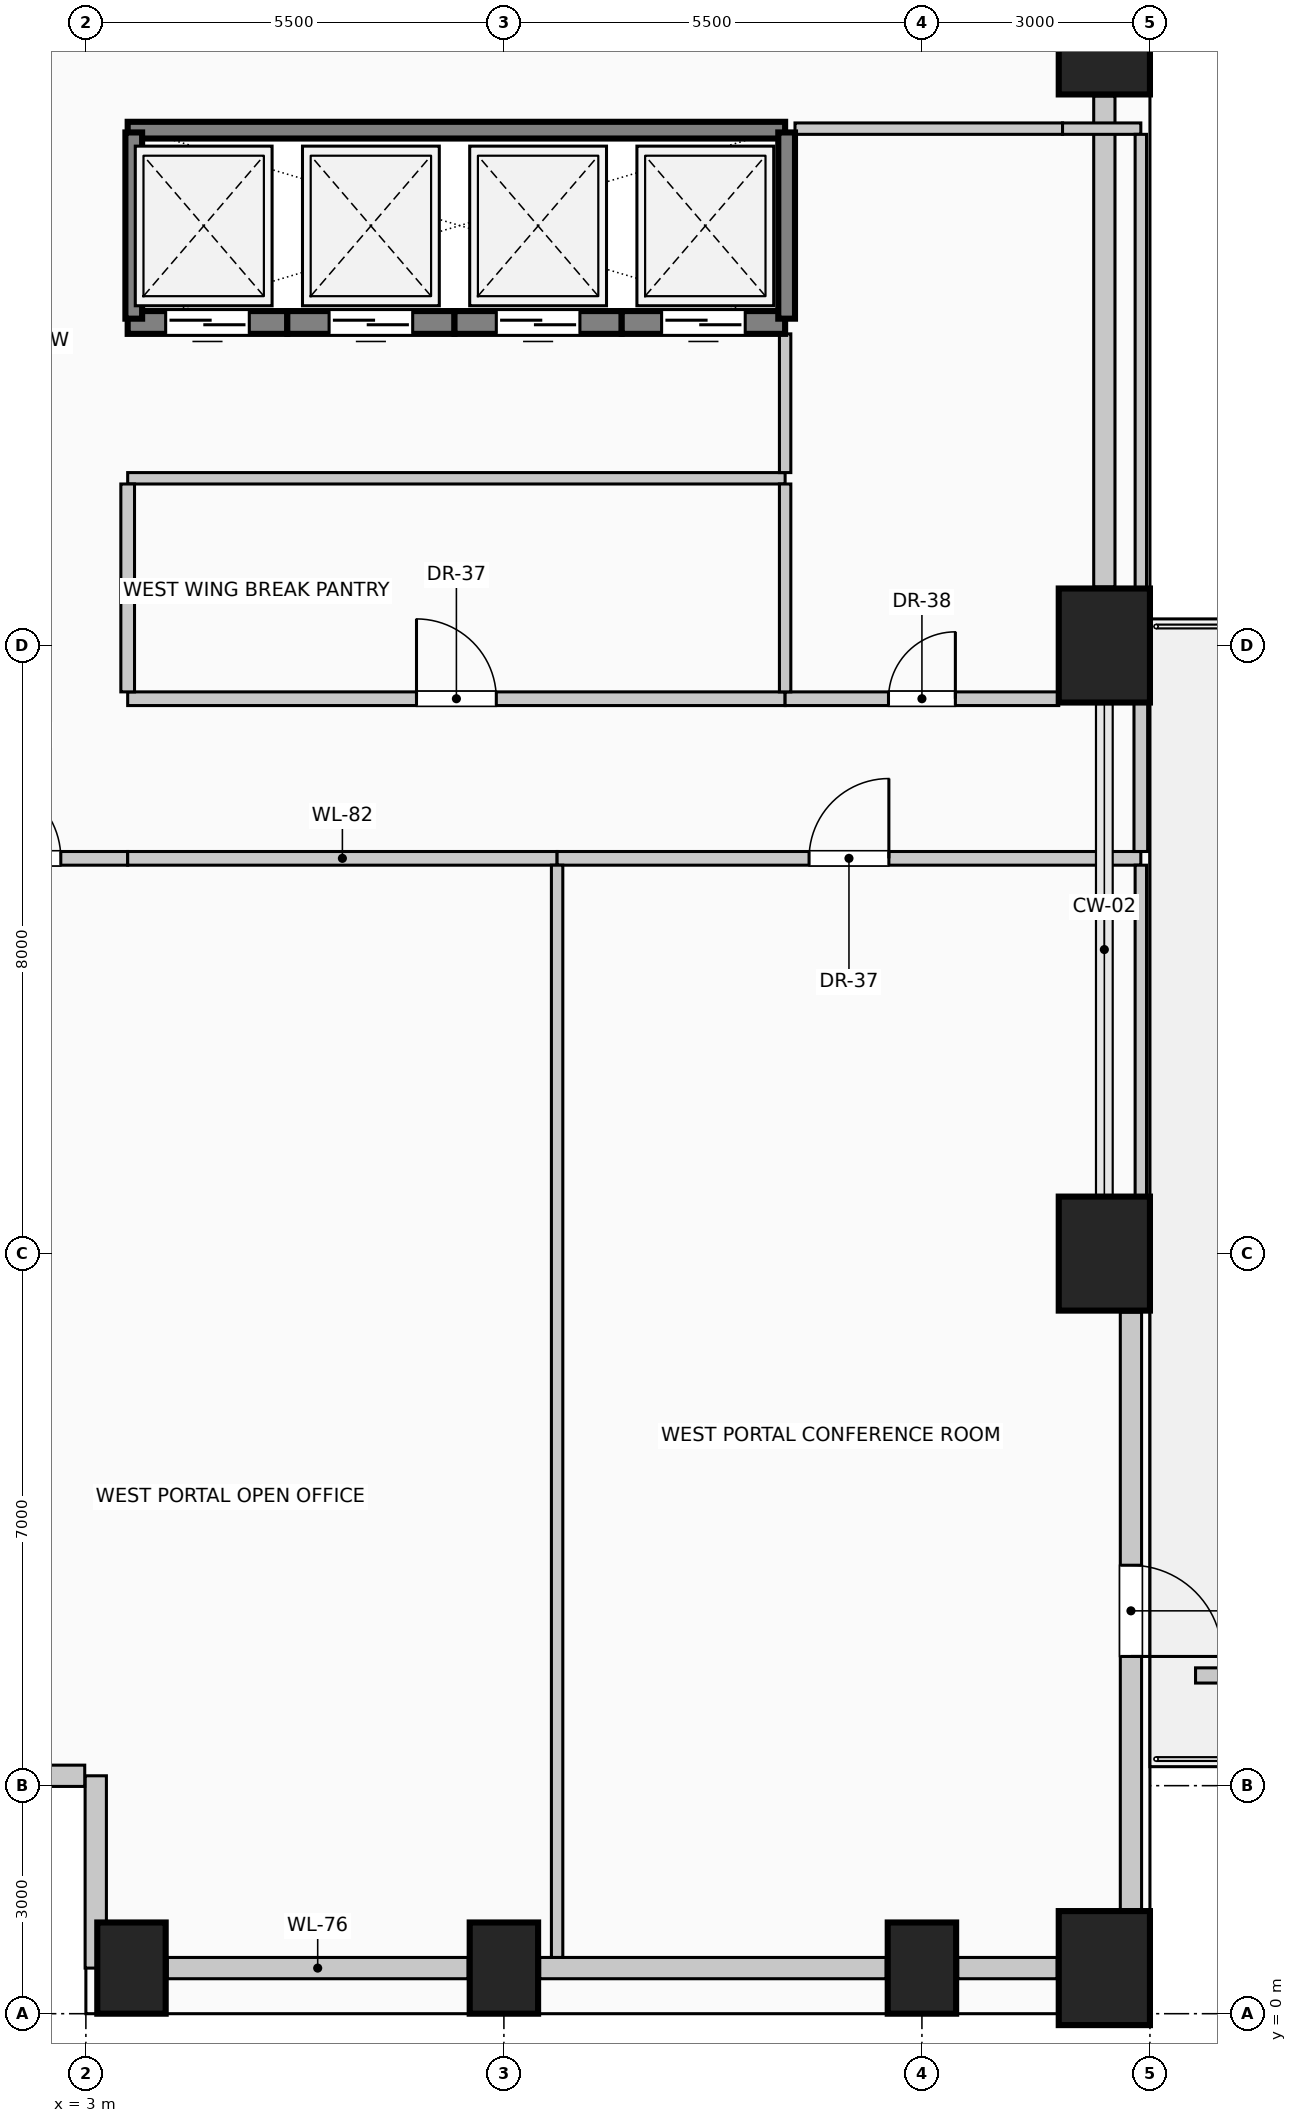
"""IFC4 building model, lengths in metres.
Left out: names, types, materials, properties, quantities, classifications, styles, units other than length and angle.
Written with IfcOpenShell. Run it as: python <this file> out.ifc"""

import sys

from ifc_helpers import new_model, si_unit, direction, frame, frame_2d, origin, origin_2d, place, context, subcontext, project, spatial, rectangle, extrude, element, fill, save


model = new_model("IFC4")
c1 = context("Model", 3, precision=1e-05, world=origin(), true_north=direction((0.0, 1.0)))
c2 = subcontext(c1, "Body", "Model", "MODEL_VIEW")
j1 = project(units=[si_unit("LENGTHUNIT", "METRE"), si_unit("PLANEANGLEUNIT", "RADIAN")], contexts=[c1])
p1 = place(None, origin())
s1 = spatial("IfcSite", under=j1, at=p1, CompositionType="ELEMENT")
p2 = place(p1, origin())
s2 = spatial("IfcBuilding", under=s1, at=p2, CompositionType="ELEMENT")
p3 = place(p2, frame((0.0, 0.0, 22.6)))
s3 = spatial("IfcBuildingStorey", under=s2, at=p3, CompositionType="ELEMENT", Elevation=22.6)
for number, where, z_axis, x_axis in (
    (1, (3.6, 0.6, 0.0), (0.0, 0.0, 1.0), (1.0, 0.0, 0.0)),
    (2, (8.5, 0.6, 0.0), (0.0, 0.0, 1.0), (1.0, 0.0, 0.0)),
    (3, (14.0, 0.6, 0.0), (0.0, 0.0, 1.0), (1.0, 0.0, 0.0)),
):
    element("IfcColumn", number, at=place(p3, frame(where, z_axis=z_axis, x_axis=x_axis)), inside=s3, PredefinedType="COLUMN", context=c2, shape_type="SweptSolid", body=[
        extrude(rectangle(XDim=0.9, YDim=1.2, at=origin_2d()), origin(), (0.0, 0.0, 1.0), 4.0),
    ])
for number, where, z_axis, x_axis in (
    (4, (16.4, 0.6, 0.0), (0.0, 0.0, 1.0), (1.0, 0.0, 0.0)),
    (5, (16.4, 10.0, 0.0), (0.0, 0.0, 1.0), (1.0, 0.0, 0.0)),
    (6, (16.4, 18.0, 0.0), (0.0, 0.0, 1.0), (1.0, 0.0, 0.0)),
    (7, (16.4, 26.0, 0.0), (0.0, 0.0, 1.0), (1.0, 0.0, 0.0)),
):
    element("IfcColumn", number, at=place(p3, frame(where, z_axis=z_axis, x_axis=x_axis)), inside=s3, PredefinedType="COLUMN", context=c2, shape_type="SweptSolid", body=[
        extrude(rectangle(XDim=1.2, YDim=1.5, at=origin_2d()), origin(), (0.0, 0.0, 1.0), 4.0),
    ])
p4 = place(p3, frame((8.03, 0.6, 0.0), z_axis=(0.0, 0.0, 1.0), x_axis=(-1.0, 0.0, 0.0)))
e8 = element("IfcWall", 8, at=p4, inside=s3, PredefinedType="SOLIDWALL", context=c2, shape_type="SweptSolid", body=[
    extrude(rectangle(XDim=3.96, YDim=0.28, at=frame_2d((1.98, 0.0))), origin(), (0.0, 0.0, 1.0), 2.85),
])
p5 = place(p3, frame((13.53, 0.6, 0.0), z_axis=(0.0, 0.0, 1.0), x_axis=(-1.0, 0.0, 0.0)))
e9 = element("IfcWall", 9, at=p5, inside=s3, PredefinedType="SOLIDWALL", context=c2, shape_type="SweptSolid", body=[
    extrude(rectangle(XDim=4.56, YDim=0.28, at=frame_2d((2.28, 0.0))), origin(), (0.0, 0.0, 1.0), 2.85),
])
p6 = place(p3, frame((15.78, 0.6, 0.0), z_axis=(0.0, 0.0, 1.0), x_axis=(-1.0, 0.0, 0.0)))
e10 = element("IfcWall", 10, at=p6, inside=s3, PredefinedType="SOLIDWALL", context=c2, shape_type="SweptSolid", body=[
    extrude(rectangle(XDim=1.31, YDim=0.28, at=frame_2d((0.655, 0.0))), origin(), (0.0, 0.0, 1.0), 2.85),
])
p7 = place(p3, frame((3.13, 0.6, 0.0), z_axis=(0.0, 0.0, 1.0), x_axis=(0.0, 1.0, 0.0)))
e11 = element("IfcWall", 11, at=p7, inside=s3, PredefinedType="SOLIDWALL", context=c2, shape_type="SweptSolid", body=[
    extrude(rectangle(XDim=2.53, YDim=0.28, at=frame_2d((1.265, 0.0))), origin(), (0.0, 0.0, 1.0), 3.7),
])
p8 = place(p3, frame((2.985, 3.13, 0.0), z_axis=(0.0, 0.0, 1.0), x_axis=(-1.0, 0.0, 0.0)))
e12 = element("IfcWall", 12, at=p8, inside=s3, PredefinedType="SOLIDWALL", context=c2, shape_type="SweptSolid", body=[
    extrude(rectangle(XDim=2.385, YDim=0.28, at=frame_2d((1.192, 0.0))), origin(), (0.0, 0.0, 1.0), 3.7),
])
p9 = place(p3, frame((16.75, 9.23, 0.0), z_axis=(0.0, 0.0, 1.0), x_axis=(0.0, -1.0, 0.0)))
e13 = element("IfcWall", 13, at=p9, inside=s3, PredefinedType="SOLIDWALL", context=c2, shape_type="SweptSolid", body=[
    extrude(rectangle(XDim=7.86, YDim=0.28, at=frame_2d((3.93, 0.0))), origin(), (0.0, 0.0, 1.0), 3.7),
])
p10 = place(p9, frame((3.33, 0.0, 0.0)))
e14 = element("IfcOpeningElement", 14, at=p10, cuts=e13, PredefinedType="OPENING", context=c2, shape_type="SweptSolid", body=[
    extrude(rectangle(XDim=1.2, YDim=2.25, at=frame_2d((0.6, 1.125))), frame((0.0, 0.15, 0.0), z_axis=(0.0, -1.0, 0.0), x_axis=(1.0, 0.0, 0.0)), (0.0, 0.0, 1.0), 0.3),
])
p11 = place(p3, frame((16.4, 25.23, 0.0), z_axis=(0.0, 0.0, 1.0), x_axis=(0.0, -1.0, 0.0)))
e15 = element("IfcWall", 15, at=p11, inside=s3, PredefinedType="SOLIDWALL", context=c2, shape_type="SweptSolid", body=[
    extrude(rectangle(XDim=6.46, YDim=0.28, at=frame_2d((3.23, 0.0))), origin(), (0.0, 0.0, 1.0), 3.0),
])
p12 = place(p3, frame((17.6, 4.45, 0.0), z_axis=(0.0, 0.0, 1.0), x_axis=(1.0, 0.0, 0.0)))
e16 = element("IfcWall", 16, at=p12, inside=s3, PredefinedType="USERDEFINED", context=c2, shape_type="SweptSolid", body=[
    extrude(rectangle(XDim=22.8, YDim=0.2, at=frame_2d((11.4, 0.0))), origin(), (0.0, 0.0, 1.0), 0.55),
])
p13 = place(p3, frame((5.65, 22.25, 0.0), z_axis=(0.0, 0.0, 1.0), x_axis=(-1.0, 0.0, 0.0)))
e17 = element("IfcWall", 17, at=p13, inside=s3, PredefinedType="SOLIDWALL", context=c2, shape_type="SweptSolid", body=[
    extrude(rectangle(XDim=2.1, YDim=0.3, at=frame_2d((1.05, 0.0))), origin(), (0.0, 0.0, 1.0), 4.0),
])
p14 = place(p13, frame((0.5, 0.0, 0.0)))
e18 = element("IfcOpeningElement", 18, at=p14, cuts=e17, PredefinedType="OPENING", context=c2, shape_type="SweptSolid", body=[
    extrude(rectangle(XDim=1.1, YDim=2.2, at=frame_2d((0.55, 1.1))), frame((0.0, 0.16, 0.0), z_axis=(0.0, -1.0, 0.0), x_axis=(1.0, 0.0, 0.0)), (0.0, 0.0, 1.0), 0.32),
])
p15 = place(p3, frame((7.85, 22.25, 0.0), z_axis=(0.0, 0.0, 1.0), x_axis=(-1.0, 0.0, 0.0)))
e19 = element("IfcWall", 19, at=p15, inside=s3, PredefinedType="SOLIDWALL", context=c2, shape_type="SweptSolid", body=[
    extrude(rectangle(XDim=2.2, YDim=0.3, at=frame_2d((1.1, 0.0))), origin(), (0.0, 0.0, 1.0), 4.0),
])
p16 = place(p15, frame((0.55, 0.0, 0.0)))
e20 = element("IfcOpeningElement", 20, at=p16, cuts=e19, PredefinedType="OPENING", context=c2, shape_type="SweptSolid", body=[
    extrude(rectangle(XDim=1.1, YDim=2.2, at=frame_2d((0.55, 1.1))), frame((0.0, 0.16, 0.0), z_axis=(0.0, -1.0, 0.0), x_axis=(1.0, 0.0, 0.0)), (0.0, 0.0, 1.0), 0.32),
])
p17 = place(p3, frame((10.05, 22.25, 0.0), z_axis=(0.0, 0.0, 1.0), x_axis=(-1.0, 0.0, 0.0)))
e21 = element("IfcWall", 21, at=p17, inside=s3, PredefinedType="SOLIDWALL", context=c2, shape_type="SweptSolid", body=[
    extrude(rectangle(XDim=2.2, YDim=0.3, at=frame_2d((1.1, 0.0))), origin(), (0.0, 0.0, 1.0), 4.0),
])
p18 = place(p17, frame((0.55, 0.0, 0.0)))
e22 = element("IfcOpeningElement", 22, at=p18, cuts=e21, PredefinedType="OPENING", context=c2, shape_type="SweptSolid", body=[
    extrude(rectangle(XDim=1.1, YDim=2.2, at=frame_2d((0.55, 1.1))), frame((0.0, 0.16, 0.0), z_axis=(0.0, -1.0, 0.0), x_axis=(1.0, 0.0, 0.0)), (0.0, 0.0, 1.0), 0.32),
])
p19 = place(p3, frame((12.2, 22.25, 0.0), z_axis=(0.0, 0.0, 1.0), x_axis=(-1.0, 0.0, 0.0)))
e23 = element("IfcWall", 23, at=p19, inside=s3, PredefinedType="SOLIDWALL", context=c2, shape_type="SweptSolid", body=[
    extrude(rectangle(XDim=2.15, YDim=0.3, at=frame_2d((1.075, 0.0))), origin(), (0.0, 0.0, 1.0), 4.0),
])
p20 = place(p19, frame((0.525, 0.0, 0.0)))
e24 = element("IfcOpeningElement", 24, at=p20, cuts=e23, PredefinedType="OPENING", context=c2, shape_type="SweptSolid", body=[
    extrude(rectangle(XDim=1.1, YDim=2.2, at=frame_2d((0.55, 1.1))), frame((0.0, 0.16, 0.0), z_axis=(0.0, -1.0, 0.0), x_axis=(1.0, 0.0, 0.0)), (0.0, 0.0, 1.0), 0.32),
])
p21 = place(p3, frame((3.55, 24.78, 0.0), z_axis=(0.0, 0.0, 1.0), x_axis=(1.0, 0.0, 0.0)))
e25 = element("IfcWall", 25, at=p21, inside=s3, PredefinedType="SOLIDWALL", context=c2, shape_type="SweptSolid", body=[
    extrude(rectangle(XDim=8.65, YDim=0.22, at=frame_2d((4.325, 0.0))), origin(), (0.0, 0.0, 1.0), 4.0),
])
for number, where, z_axis, x_axis in (
    (26, (3.63, 22.3, 0.0), (0.0, 0.0, 1.0), (0.0, 1.0, 0.0)),
    (27, (12.22, 22.3, 0.0), (0.0, 0.0, 1.0), (0.0, 1.0, 0.0)),
):
    element("IfcWall", number, at=place(p3, frame(where, z_axis=z_axis, x_axis=x_axis)), inside=s3, PredefinedType="SOLIDWALL", context=c2, shape_type="SweptSolid", body=[
        extrude(rectangle(XDim=2.45, YDim=0.22, at=frame_2d((1.225, 0.0))), origin(), (0.0, 0.0, 1.0), 4.0),
    ])
p22 = place(p3, frame((0.74, 15.2, 0.0), z_axis=(0.0, 0.0, 1.0), x_axis=(1.0, 0.0, 0.0)))
e28 = element("IfcWall", 28, at=p22, inside=s3, PredefinedType="PARTITIONING", context=c2, shape_type="SweptSolid", body=[
    extrude(rectangle(XDim=2.81, YDim=0.18, at=frame_2d((1.405, 0.0))), origin(), (0.0, 0.0, 1.0), 3.7),
])
p23 = place(p22, frame((0.88, 0.0, 0.0)))
e29 = element("IfcOpeningElement", 29, at=p23, cuts=e28, PredefinedType="OPENING", context=c2, shape_type="SweptSolid", body=[
    extrude(rectangle(XDim=1.05, YDim=2.15, at=frame_2d((0.525, 1.075))), frame((0.0, 0.1, 0.0), z_axis=(0.0, -1.0, 0.0), x_axis=(1.0, 0.0, 0.0)), (0.0, 0.0, 1.0), 0.2),
])
p24 = place(p3, frame((3.55, 15.2, 0.0), z_axis=(0.0, 0.0, 1.0), x_axis=(1.0, 0.0, 0.0)))
e30 = element("IfcWall", 30, at=p24, inside=s3, PredefinedType="PARTITIONING", context=c2, shape_type="SweptSolid", body=[
    extrude(rectangle(XDim=5.65, YDim=0.18, at=frame_2d((2.825, 0.0))), origin(), (0.0, 0.0, 1.0), 3.7),
])
p25 = place(p3, frame((9.2, 15.2, 0.0), z_axis=(0.0, 0.0, 1.0), x_axis=(1.0, 0.0, 0.0)))
e31 = element("IfcWall", 31, at=p25, inside=s3, PredefinedType="PARTITIONING", context=c2, shape_type="SweptSolid", body=[
    extrude(rectangle(XDim=7.68, YDim=0.18, at=frame_2d((3.84, 0.0))), origin(), (0.0, 0.0, 1.0), 3.7),
])
p26 = place(p25, frame((3.315, 0.0, 0.0)))
e32 = element("IfcOpeningElement", 32, at=p26, cuts=e31, PredefinedType="OPENING", context=c2, shape_type="SweptSolid", body=[
    extrude(rectangle(XDim=1.05, YDim=2.15, at=frame_2d((0.525, 1.075))), frame((0.0, 0.1, 0.0), z_axis=(0.0, -1.0, 0.0), x_axis=(1.0, 0.0, 0.0)), (0.0, 0.0, 1.0), 0.2),
])
p27 = place(p3, frame((3.55, 17.3, 0.0), z_axis=(0.0, 0.0, 1.0), x_axis=(1.0, 0.0, 0.0)))
e33 = element("IfcWall", 33, at=p27, inside=s3, PredefinedType="PARTITIONING", context=c2, shape_type="SweptSolid", body=[
    extrude(rectangle(XDim=8.65, YDim=0.18, at=frame_2d((4.325, 0.0))), origin(), (0.0, 0.0, 1.0), 3.7),
])
p28 = place(p27, frame((3.8, 0.0, 0.0)))
e34 = element("IfcOpeningElement", 34, at=p28, cuts=e33, PredefinedType="OPENING", context=c2, shape_type="SweptSolid", body=[
    extrude(rectangle(XDim=1.05, YDim=2.15, at=frame_2d((0.525, 1.075))), frame((0.0, 0.1, 0.0), z_axis=(0.0, -1.0, 0.0), x_axis=(1.0, 0.0, 0.0)), (0.0, 0.0, 1.0), 0.2),
])
p29 = place(p3, frame((12.2, 17.3, 0.0), z_axis=(0.0, 0.0, 1.0), x_axis=(1.0, 0.0, 0.0)))
e35 = element("IfcWall", 35, at=p29, inside=s3, PredefinedType="PARTITIONING", context=c2, shape_type="SweptSolid", body=[
    extrude(rectangle(XDim=3.6, YDim=0.18, at=frame_2d((1.8, 0.0))), origin(), (0.0, 0.0, 1.0), 3.7),
])
p30 = place(p29, frame((1.36, 0.0, 0.0)))
e36 = element("IfcOpeningElement", 36, at=p30, cuts=e35, PredefinedType="OPENING", context=c2, shape_type="SweptSolid", body=[
    extrude(rectangle(XDim=0.88, YDim=2.1, at=frame_2d((0.44, 1.05))), frame((0.0, 0.1, 0.0), z_axis=(0.0, -1.0, 0.0), x_axis=(1.0, 0.0, 0.0)), (0.0, 0.0, 1.0), 0.2),
])
p31 = place(p3, frame((3.55, 20.2, 0.0), z_axis=(0.0, 0.0, 1.0), x_axis=(1.0, 0.0, 0.0)))
e37 = element("IfcWall", 37, at=p31, inside=s3, PredefinedType="PARTITIONING", context=c2, shape_type="SweptSolid", body=[
    extrude(rectangle(XDim=8.65, YDim=0.15, at=frame_2d((4.325, 0.0))), origin(), (0.0, 0.0, 1.0), 3.7),
])
p32 = place(p3, frame((12.33, 24.8, 0.0), z_axis=(0.0, 0.0, 1.0), x_axis=(1.0, 0.0, 0.0)))
e38 = element("IfcWall", 38, at=p32, inside=s3, PredefinedType="PARTITIONING", context=c2, shape_type="SweptSolid", body=[
    extrude(rectangle(XDim=3.52, YDim=0.15, at=frame_2d((1.76, 0.0))), origin(), (0.0, 0.0, 1.0), 3.7),
])
p33 = place(p3, frame((15.85, 24.8, 0.0), z_axis=(0.0, 0.0, 1.0), x_axis=(1.0, 0.0, 0.0)))
e39 = element("IfcWall", 39, at=p33, inside=s3, PredefinedType="PARTITIONING", context=c2, shape_type="SweptSolid", body=[
    extrude(rectangle(XDim=1.03, YDim=0.15, at=frame_2d((0.515, 0.0))), origin(), (0.0, 0.0, 1.0), 3.7),
])
p34 = place(p3, frame((3.55, 17.39, 0.0), z_axis=(0.0, 0.0, 1.0), x_axis=(0.0, 1.0, 0.0)))
e40 = element("IfcWall", 40, at=p34, inside=s3, PredefinedType="PARTITIONING", context=c2, shape_type="SweptSolid", body=[
    extrude(rectangle(XDim=2.735, YDim=0.18, at=frame_2d((1.368, 0.0))), origin(), (0.0, 0.0, 1.0), 3.7),
])
p35 = place(p3, frame((9.2, 0.74, 0.0), z_axis=(0.0, 0.0, 1.0), x_axis=(0.0, 1.0, 0.0)))
e41 = element("IfcWall", 41, at=p35, inside=s3, PredefinedType="PARTITIONING", context=c2, shape_type="SweptSolid", body=[
    extrude(rectangle(XDim=14.37, YDim=0.15, at=frame_2d((7.185, 0.0))), origin(), (0.0, 0.0, 1.0), 3.7),
])
p36 = place(p3, frame((12.2, 17.39, 0.0), z_axis=(0.0, 0.0, 1.0), x_axis=(0.0, 1.0, 0.0)))
e42 = element("IfcWall", 42, at=p36, inside=s3, PredefinedType="PARTITIONING", context=c2, shape_type="SweptSolid", body=[
    extrude(rectangle(XDim=2.735, YDim=0.15, at=frame_2d((1.368, 0.0))), origin(), (0.0, 0.0, 1.0), 3.7),
])
p37 = place(p3, frame((12.2, 20.275, 0.0), z_axis=(0.0, 0.0, 1.0), x_axis=(0.0, 1.0, 0.0)))
e43 = element("IfcWall", 43, at=p37, inside=s3, PredefinedType="PARTITIONING", context=c2, shape_type="SweptSolid", body=[
    extrude(rectangle(XDim=1.825, YDim=0.15, at=frame_2d((0.913, 0.0))), origin(), (0.0, 0.0, 1.0), 3.7),
])
p38 = place(p3, frame((16.88, 10.75, 0.0), z_axis=(0.0, 0.0, 1.0), x_axis=(0.0, 1.0, 0.0)))
e44 = element("IfcWall", 44, at=p38, inside=s3, PredefinedType="PARTITIONING", context=c2, shape_type="SweptSolid", body=[
    extrude(rectangle(XDim=4.36, YDim=0.15, at=frame_2d((2.18, 0.0))), origin(), (0.0, 0.0, 1.0), 3.7),
])
p39 = place(p3, frame((16.88, 15.29, 0.0), z_axis=(0.0, 0.0, 1.0), x_axis=(0.0, 1.0, 0.0)))
e45 = element("IfcWall", 45, at=p39, inside=s3, PredefinedType="PARTITIONING", context=c2, shape_type="SweptSolid", body=[
    extrude(rectangle(XDim=1.96, YDim=0.18, at=frame_2d((0.98, 0.0))), origin(), (0.0, 0.0, 1.0), 3.7),
])
p40 = place(p3, frame((16.88, 18.75, 0.0), z_axis=(0.0, 0.0, 1.0), x_axis=(0.0, 1.0, 0.0)))
e46 = element("IfcWall", 46, at=p40, inside=s3, PredefinedType="PARTITIONING", context=c2, shape_type="SweptSolid", body=[
    extrude(rectangle(XDim=5.975, YDim=0.15, at=frame_2d((2.988, 0.0))), origin(), (0.0, 0.0, 1.0), 3.7),
])
p41 = place(p10, origin())
e47 = element("IfcDoor", 47, at=p41, inside=s3, OperationType="SINGLE_SWING_RIGHT", PredefinedType="DOOR", context=c2, shape_type="SweptSolid", body=[
    extrude(rectangle(XDim=1.2, YDim=2.25, at=frame_2d((0.6, 1.125))), frame((0.0, 0.025, 0.0), z_axis=(0.0, -1.0, 0.0), x_axis=(1.0, 0.0, 0.0)), (0.0, 0.0, 1.0), 0.05),
])
fill(e14, e47)
p42 = place(p14, origin())
e48 = element("IfcDoor", 48, at=p42, inside=s3, OperationType="SLIDING_TO_LEFT", PredefinedType="DOOR", context=c2, shape_type="SweptSolid", body=[
    extrude(rectangle(XDim=1.1, YDim=2.2, at=frame_2d((0.55, 1.1))), frame((0.0, 0.025, 0.0), z_axis=(0.0, -1.0, 0.0), x_axis=(1.0, 0.0, 0.0)), (0.0, 0.0, 1.0), 0.05),
])
fill(e18, e48)
p43 = place(p16, origin())
e49 = element("IfcDoor", 49, at=p43, inside=s3, OperationType="SLIDING_TO_RIGHT", PredefinedType="DOOR", context=c2, shape_type="SweptSolid", body=[
    extrude(rectangle(XDim=1.1, YDim=2.2, at=frame_2d((0.55, 1.1))), frame((0.0, 0.025, 0.0), z_axis=(0.0, -1.0, 0.0), x_axis=(1.0, 0.0, 0.0)), (0.0, 0.0, 1.0), 0.05),
])
fill(e20, e49)
p44 = place(p18, origin())
e50 = element("IfcDoor", 50, at=p44, inside=s3, OperationType="SLIDING_TO_LEFT", PredefinedType="DOOR", context=c2, shape_type="SweptSolid", body=[
    extrude(rectangle(XDim=1.1, YDim=2.2, at=frame_2d((0.55, 1.1))), frame((0.0, 0.025, 0.0), z_axis=(0.0, -1.0, 0.0), x_axis=(1.0, 0.0, 0.0)), (0.0, 0.0, 1.0), 0.05),
])
fill(e22, e50)
p45 = place(p20, origin())
e51 = element("IfcDoor", 51, at=p45, inside=s3, OperationType="SLIDING_TO_RIGHT", PredefinedType="DOOR", context=c2, shape_type="SweptSolid", body=[
    extrude(rectangle(XDim=1.1, YDim=2.2, at=frame_2d((0.55, 1.1))), frame((0.0, 0.025, 0.0), z_axis=(0.0, -1.0, 0.0), x_axis=(1.0, 0.0, 0.0)), (0.0, 0.0, 1.0), 0.05),
])
fill(e24, e51)
p46 = place(p23, origin())
e52 = element("IfcDoor", 52, at=p46, inside=s3, OperationType="SINGLE_SWING_LEFT", PredefinedType="DOOR", context=c2, shape_type="SweptSolid", body=[
    extrude(rectangle(XDim=1.05, YDim=2.15, at=frame_2d((0.525, 1.075))), frame((0.0, 0.025, 0.0), z_axis=(0.0, -1.0, 0.0), x_axis=(1.0, 0.0, 0.0)), (0.0, 0.0, 1.0), 0.05),
])
fill(e29, e52)
p47 = place(p26, origin())
e53 = element("IfcDoor", 53, at=p47, inside=s3, OperationType="SINGLE_SWING_RIGHT", PredefinedType="DOOR", context=c2, shape_type="SweptSolid", body=[
    extrude(rectangle(XDim=1.05, YDim=2.15, at=frame_2d((0.525, 1.075))), frame((0.0, 0.025, 0.0), z_axis=(0.0, -1.0, 0.0), x_axis=(1.0, 0.0, 0.0)), (0.0, 0.0, 1.0), 0.05),
])
fill(e32, e53)
p48 = place(p28, origin())
e54 = element("IfcDoor", 54, at=p48, inside=s3, OperationType="SINGLE_SWING_LEFT", PredefinedType="DOOR", context=c2, shape_type="SweptSolid", body=[
    extrude(rectangle(XDim=1.05, YDim=2.15, at=frame_2d((0.525, 1.075))), frame((0.0, 0.025, 0.0), z_axis=(0.0, -1.0, 0.0), x_axis=(1.0, 0.0, 0.0)), (0.0, 0.0, 1.0), 0.05),
])
fill(e34, e54)
p49 = place(p30, origin())
e55 = element("IfcDoor", 55, at=p49, inside=s3, OperationType="SINGLE_SWING_RIGHT", PredefinedType="DOOR", context=c2, shape_type="SweptSolid", body=[
    extrude(rectangle(XDim=0.88, YDim=2.1, at=frame_2d((0.44, 1.05))), frame((0.0, 0.025, 0.0), z_axis=(0.0, -1.0, 0.0), x_axis=(1.0, 0.0, 0.0)), (0.0, 0.0, 1.0), 0.05),
])
fill(e36, e55)
save(model, sys.argv[1])
